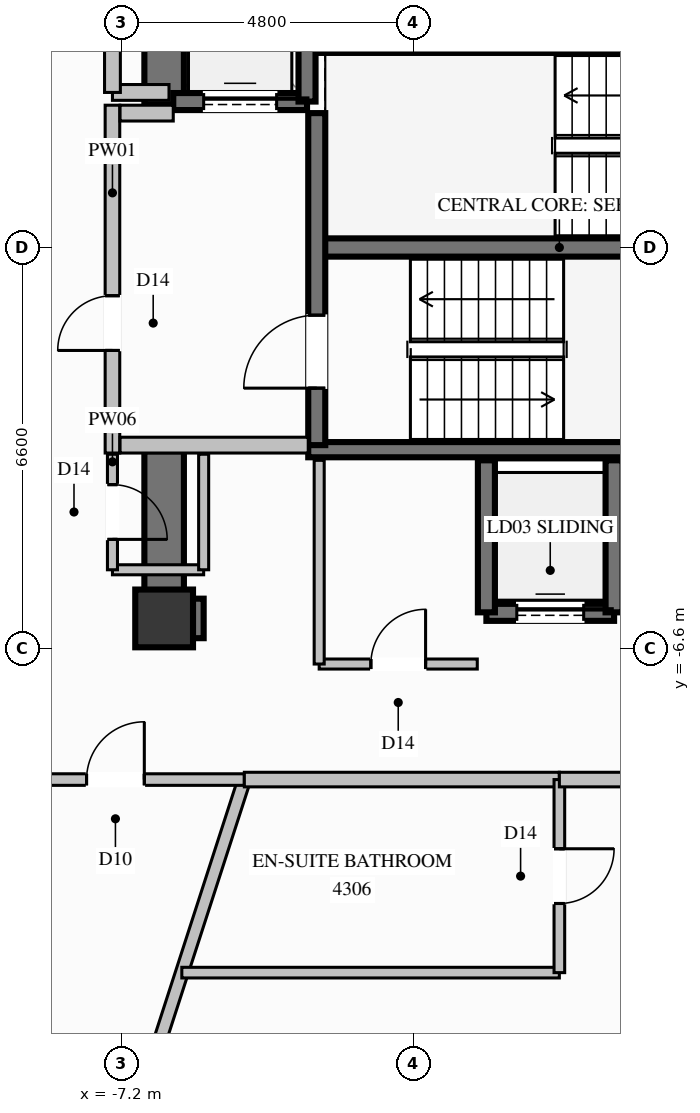
"""IFC4 building model, lengths in metres.
Left out: names, types, materials, properties, quantities, classifications, styles, units other than length and angle.
Written with IfcOpenShell. Run it as: python <this file> out.ifc"""

import sys

from ifc_helpers import new_model, si_unit, direction, frame, frame_2d, origin, origin_2d, place, context, subcontext, project, spatial, rectangle, extrude, element, fill, save


model = new_model("IFC4")
c1 = context("Model", 3, precision=1e-05, world=origin(), true_north=direction((0.0, 1.0)))
c2 = subcontext(c1, "Body", "Model", "MODEL_VIEW")
j1 = project(units=[si_unit("LENGTHUNIT", "METRE"), si_unit("PLANEANGLEUNIT", "RADIAN")], contexts=[c1])
p1 = place(None, origin())
s1 = spatial("IfcSite", under=j1, at=p1, CompositionType="ELEMENT")
p2 = place(p1, origin())
s2 = spatial("IfcBuilding", under=s1, at=p2, CompositionType="ELEMENT")
p3 = place(p2, frame((0.0, 0.0, 160.2)))
s3 = spatial("IfcBuildingStorey", under=s2, at=p3, CompositionType="ELEMENT", Elevation=160.2)
p4 = place(p3, frame((-6.5, -6.1, 0.0), z_axis=(0.0, 0.0, 1.0), x_axis=(1.0, 0.0, 0.0)))
e1 = element("IfcColumn", 1, at=p4, inside=s3, PredefinedType="COLUMN", context=c2, shape_type="SweptSolid", body=[
    extrude(rectangle(XDim=0.95, YDim=0.95, at=origin_2d()), origin(), (0.0, 0.0, 1.0), 3.6),
])
p5 = place(p3, frame((-3.99, 0.0, 0.0), z_axis=(0.0, 0.0, 1.0), x_axis=(1.0, 0.0, 0.0)))
e2 = element("IfcWall", 2, at=p5, inside=s3, PredefinedType="SHEAR", context=c2, shape_type="SweptSolid", body=[
    extrude(rectangle(XDim=7.98, YDim=0.3, at=frame_2d((3.99, 0.0))), origin(), (0.0, 0.0, 1.0), 3.6),
])
for number, where, z_axis, x_axis in (
    (3, (-4.13, -3.325, 0.0), (0.0, 0.0, 1.0), (1.0, 0.0, 0.0)),
    (4, (-4.13, 3.325, 0.0), (0.0, 0.0, 1.0), (1.0, 0.0, 0.0)),
):
    element("IfcWall", number, at=place(p3, frame(where, z_axis=z_axis, x_axis=x_axis)), inside=s3, PredefinedType="SOLIDWALL", context=c2, shape_type="SweptSolid", body=[
        extrude(rectangle(XDim=8.26, YDim=0.25, at=frame_2d((4.13, 0.0))), origin(), (0.0, 0.0, 1.0), 3.6),
    ])
p6 = place(p3, frame((-6.175, -6.1, 0.0), z_axis=(0.0, 0.0, 1.0), x_axis=(1.0, 0.0, 0.0)))
e5 = element("IfcWall", 5, at=p6, inside=s3, PredefinedType="SHEAR", context=c2, shape_type="SweptSolid", body=[
    extrude(rectangle(XDim=0.325, YDim=0.65, at=frame_2d((0.163, 0.0))), origin(), (0.0, 0.0, 1.0), 3.6),
])
p7 = place(p3, frame((-6.5, 2.35, 0.0), z_axis=(0.0, 0.0, 1.0), x_axis=(0.0, 1.0, 0.0)))
e6 = element("IfcWall", 6, at=p7, inside=s3, PredefinedType="SHEAR", context=c2, shape_type="SweptSolid", body=[
    extrude(rectangle(XDim=4.075, YDim=0.65, at=frame_2d((2.038, 0.0))), origin(), (0.0, 0.0, 1.0), 3.6),
])
p8 = place(p3, frame((-6.5, -6.425, 0.0), z_axis=(0.0, 0.0, 1.0), x_axis=(0.0, 1.0, 0.0)))
e7 = element("IfcWall", 7, at=p8, inside=s3, PredefinedType="SHEAR", context=c2, shape_type="SweptSolid", body=[
    extrude(rectangle(XDim=3.075, YDim=0.65, at=frame_2d((1.538, 0.0))), origin(), (0.0, 0.0, 1.0), 3.6),
])
p9 = place(p3, frame((-1.2, -6.0, 0.0), z_axis=(0.0, 0.0, 1.0), x_axis=(1.0, 0.0, 0.0)))
e8 = element("IfcWall", 8, at=p9, inside=s3, PredefinedType="SOLIDWALL", context=c2, shape_type="SweptSolid", body=[
    extrude(rectangle(XDim=2.1, YDim=0.28, at=frame_2d((1.05, 0.0))), origin(), (0.0, 0.0, 1.0), 3.2),
])
p10 = place(p9, frame((0.5, 0.0, 0.0)))
e9 = element("IfcOpeningElement", 9, at=p10, cuts=e8, PredefinedType="OPENING", context=c2, shape_type="SweptSolid", body=[
    extrude(rectangle(XDim=1.1, YDim=2.02, at=frame_2d((0.55, 1.01))), frame((0.0, 0.15, 0.0), z_axis=(0.0, -1.0, 0.0), x_axis=(1.0, 0.0, 0.0)), (0.0, 0.0, 1.0), 0.3),
])
for number, where, z_axis, x_axis in (
    (10, (-1.2, -3.5, 0.0), (0.0, 0.0, 1.0), (0.0, -1.0, 0.0)),
    (11, (0.9, -6.0, 0.0), (0.0, 0.0, 1.0), (0.0, 1.0, 0.0)),
):
    element("IfcWall", number, at=place(p3, frame(where, z_axis=z_axis, x_axis=x_axis)), inside=s3, PredefinedType="SOLIDWALL", context=c2, shape_type="SweptSolid", body=[
        extrude(rectangle(XDim=2.5, YDim=0.28, at=frame_2d((1.25, 0.0))), origin(), (0.0, 0.0, 1.0), 3.2),
    ])
p11 = place(p3, frame((-6.35, 2.4, 0.0), z_axis=(0.0, 0.0, 1.0), x_axis=(1.0, 0.0, 0.0)))
e12 = element("IfcWall", 12, at=p11, inside=s3, PredefinedType="SOLIDWALL", context=c2, shape_type="SweptSolid", body=[
    extrude(rectangle(XDim=2.2, YDim=0.28, at=frame_2d((1.1, 0.0))), origin(), (0.0, 0.0, 1.0), 3.2),
])
p12 = place(p11, frame((0.5, 0.0, 0.0)))
e13 = element("IfcOpeningElement", 13, at=p12, cuts=e12, PredefinedType="OPENING", context=c2, shape_type="SweptSolid", body=[
    extrude(rectangle(XDim=1.2, YDim=2.2, at=frame_2d((0.6, 1.1))), frame((0.0, 0.15, 0.0), z_axis=(0.0, -1.0, 0.0), x_axis=(1.0, 0.0, 0.0)), (0.0, 0.0, 1.0), 0.3),
])
p13 = place(p3, frame((-4.15, 2.4, 0.0), z_axis=(0.0, 0.0, 1.0), x_axis=(0.0, 1.0, 0.0)))
e14 = element("IfcWall", 14, at=p13, inside=s3, PredefinedType="SOLIDWALL", context=c2, shape_type="SweptSolid", body=[
    extrude(rectangle(XDim=2.7, YDim=0.28, at=frame_2d((1.35, 0.0))), origin(), (0.0, 0.0, 1.0), 3.2),
])
p14 = place(p3, frame((-3.99, -3.25, 0.0), z_axis=(0.0, 0.0, 1.0), x_axis=(0.0, 1.0, 0.0)))
e15 = element("IfcWall", 15, at=p14, inside=s3, PredefinedType="SOLIDWALL", context=c2, shape_type="SweptSolid", body=[
    extrude(rectangle(XDim=5.46, YDim=0.28, at=frame_2d((2.73, 0.0))), origin(), (0.0, 0.0, 1.0), 3.2),
])
p15 = place(p14, frame((0.937, 0.0, 0.0)))
e16 = element("IfcOpeningElement", 16, at=p15, cuts=e15, PredefinedType="OPENING", context=c2, shape_type="SweptSolid", body=[
    extrude(rectangle(XDim=1.2, YDim=2.2, at=frame_2d((0.6, 1.1))), frame((0.0, 0.15, 0.0), z_axis=(0.0, -1.0, 0.0), x_axis=(1.0, 0.0, 0.0)), (0.0, 0.0, 1.0), 0.3),
])
p16 = place(p3, frame((-7.35, -3.38, 0.0), z_axis=(0.0, 0.0, 1.0), x_axis=(0.0, 1.0, 0.0)))
e17 = element("IfcWall", 17, at=p16, inside=s3, PredefinedType="PARTITIONING", context=c2, shape_type="SweptSolid", body=[
    extrude(rectangle(XDim=5.72, YDim=0.24, at=frame_2d((2.86, 0.0))), origin(), (0.0, 0.0, 1.0), 3.2),
])
p17 = place(p16, frame((1.687, 0.0, 0.0)))
e18 = element("IfcOpeningElement", 18, at=p17, cuts=e17, PredefinedType="OPENING", context=c2, shape_type="SweptSolid", body=[
    extrude(rectangle(XDim=0.9, YDim=2.02, at=frame_2d((0.45, 1.01))), frame((0.0, 0.13, 0.0), z_axis=(0.0, -1.0, 0.0), x_axis=(1.0, 0.0, 0.0)), (0.0, 0.0, 1.0), 0.26),
])
p18 = place(p3, frame((-7.225, -3.25, 0.0), z_axis=(0.0, 0.0, 1.0), x_axis=(1.0, 0.0, 0.0)))
e19 = element("IfcWall", 19, at=p18, inside=s3, PredefinedType="PARTITIONING", context=c2, shape_type="SweptSolid", body=[
    extrude(rectangle(XDim=3.095, YDim=0.26, at=frame_2d((1.548, 0.0))), origin(), (0.0, 0.0, 1.0), 3.2),
])
p19 = place(p3, frame((-7.225, 2.21, 0.0), z_axis=(0.0, 0.0, 1.0), x_axis=(1.0, 0.0, 0.0)))
e20 = element("IfcWall", 20, at=p19, inside=s3, PredefinedType="PARTITIONING", context=c2, shape_type="SweptSolid", body=[
    extrude(rectangle(XDim=0.875, YDim=0.26, at=frame_2d((0.438, 0.0))), origin(), (0.0, 0.0, 1.0), 3.2),
])
p20 = place(p3, frame((-7.35, 2.55, 0.0), z_axis=(0.0, 0.0, 1.0), x_axis=(1.0, 0.0, 0.0)))
e21 = element("IfcWall", 21, at=p20, inside=s3, PredefinedType="PARTITIONING", context=c2, shape_type="SweptSolid", body=[
    extrude(rectangle(XDim=0.93, YDim=0.26, at=frame_2d((0.465, 0.0))), origin(), (0.0, 0.0, 1.0), 3.2),
])
p21 = place(p3, frame((-7.35, 2.55, 0.0), z_axis=(0.0, 0.0, 1.0), x_axis=(0.0, 1.0, 0.0)))
e22 = element("IfcWall", 22, at=p21, inside=s3, PredefinedType="PARTITIONING", context=c2, shape_type="SweptSolid", body=[
    extrude(rectangle(XDim=2.4, YDim=0.26, at=frame_2d((1.2, 0.0))), origin(), (0.0, 0.0, 1.0), 3.2),
])
p22 = place(p21, frame((0.75, 0.0, 0.0)))
e23 = element("IfcOpeningElement", 23, at=p22, cuts=e22, PredefinedType="OPENING", context=c2, shape_type="SweptSolid", body=[
    extrude(rectangle(XDim=0.9, YDim=2.02, at=frame_2d((0.45, 1.01))), frame((0.0, 0.14, 0.0), z_axis=(0.0, -1.0, 0.0), x_axis=(1.0, 0.0, 0.0)), (0.0, 0.0, 1.0), 0.28),
])
p23 = place(p3, frame((-7.35, -5.3, 0.0), z_axis=(0.0, 0.0, 1.0), x_axis=(1.0, 0.0, 0.0)))
e24 = element("IfcWall", 24, at=p23, inside=s3, PredefinedType="PARTITIONING", context=c2, shape_type="SweptSolid", body=[
    extrude(rectangle(XDim=1.5, YDim=0.165, at=frame_2d((0.75, 0.0))), origin(), (0.0, 0.0, 1.0), 3.2),
])
p24 = place(p3, frame((-5.85, -5.3, 0.0), z_axis=(0.0, 0.0, 1.0), x_axis=(0.0, 1.0, 0.0)))
e25 = element("IfcWall", 25, at=p24, inside=s3, PredefinedType="PARTITIONING", context=c2, shape_type="SweptSolid", body=[
    extrude(rectangle(XDim=1.9, YDim=0.165, at=frame_2d((0.95, 0.0))), origin(), (0.0, 0.0, 1.0), 2.067),
])
p25 = place(p3, frame((-7.35, -3.4, 0.0), z_axis=(0.0, 0.0, 1.0), x_axis=(0.0, -1.0, 0.0)))
e26 = element("IfcWall", 26, at=p25, inside=s3, PredefinedType="PARTITIONING", context=c2, shape_type="SweptSolid", body=[
    extrude(rectangle(XDim=1.9, YDim=0.165, at=frame_2d((0.95, 0.0))), origin(), (0.0, 0.0, 1.0), 3.2),
])
p26 = place(p25, frame((0.5, 0.0, 0.0)))
e27 = element("IfcOpeningElement", 27, at=p26, cuts=e26, PredefinedType="OPENING", context=c2, shape_type="SweptSolid", body=[
    extrude(rectangle(XDim=0.9, YDim=2.02, at=frame_2d((0.45, 1.01))), frame((0.0, 0.093, 0.0), z_axis=(0.0, -1.0, 0.0), x_axis=(1.0, 0.0, 0.0)), (0.0, 0.0, 1.0), 0.185),
])
p27 = place(p3, frame((-3.95, -6.85, 0.0), z_axis=(0.0, 0.0, 1.0), x_axis=(1.0, 0.0, 0.0)))
e28 = element("IfcWall", 28, at=p27, inside=s3, PredefinedType="PARTITIONING", context=c2, shape_type="SweptSolid", body=[
    extrude(rectangle(XDim=2.6, YDim=0.165, at=frame_2d((1.3, 0.0))), origin(), (0.0, 0.0, 1.0), 3.2),
])
p28 = place(p27, frame((0.85, 0.0, 0.0)))
e29 = element("IfcOpeningElement", 29, at=p28, cuts=e28, PredefinedType="OPENING", context=c2, shape_type="SweptSolid", body=[
    extrude(rectangle(XDim=0.9, YDim=2.02, at=frame_2d((0.45, 1.01))), frame((0.0, 0.093, 0.0), z_axis=(0.0, -1.0, 0.0), x_axis=(1.0, 0.0, 0.0)), (0.0, 0.0, 1.0), 0.185),
])
p29 = place(p3, frame((-3.95, -3.5, 0.0), z_axis=(0.0, 0.0, 1.0), x_axis=(0.0, -1.0, 0.0)))
e30 = element("IfcWall", 30, at=p29, inside=s3, PredefinedType="PARTITIONING", context=c2, shape_type="SweptSolid", body=[
    extrude(rectangle(XDim=3.35, YDim=0.165, at=frame_2d((1.675, 0.0))), origin(), (0.0, 0.0, 1.0), 3.2),
])
p30 = place(p3, frame((-5.181, -8.75, 0.0), z_axis=(0.0, 0.0, 1.0), x_axis=(-0.308017807396, -0.951380591733, 0.0)))
e31 = element("IfcWall", 31, at=p30, inside=s3, PredefinedType="PARTITIONING", context=c2, shape_type="SweptSolid", body=[
    extrude(rectangle(XDim=11.123, YDim=0.21, at=frame_2d((5.562, 0.0))), origin(), (0.0, 0.0, 1.0), 2.067),
])
p31 = place(p3, frame((-9.42, -8.75, 0.0), z_axis=(0.0, 0.0, 1.0), x_axis=(1.0, 0.0, 0.0)))
e32 = element("IfcWall", 32, at=p31, inside=s3, PredefinedType="PARTITIONING", context=c2, shape_type="SweptSolid", body=[
    extrude(rectangle(XDim=4.239, YDim=0.19, at=frame_2d((2.12, 0.0))), origin(), (0.0, 0.0, 1.0), 3.2),
])
p32 = place(p31, frame((1.644, 0.0, 0.0)))
e33 = element("IfcOpeningElement", 33, at=p32, cuts=e32, PredefinedType="OPENING", context=c2, shape_type="SweptSolid", body=[
    extrude(rectangle(XDim=0.95, YDim=2.1, at=frame_2d((0.475, 1.05))), frame((0.0, 0.105, 0.0), z_axis=(0.0, -1.0, 0.0), x_axis=(1.0, 0.0, 0.0)), (0.0, 0.0, 1.0), 0.21),
])
p33 = place(p3, frame((-5.181, -8.75, 0.0), z_axis=(0.0, 0.0, 1.0), x_axis=(1.0, 0.0, 0.0)))
e34 = element("IfcWall", 34, at=p33, inside=s3, PredefinedType="PARTITIONING", context=c2, shape_type="SweptSolid", body=[
    extrude(rectangle(XDim=5.181, YDim=0.24, at=frame_2d((2.59, 0.0))), origin(), (0.0, 0.0, 1.0), 3.2),
])
p34 = place(p3, frame((-6.209, -11.925, 0.0), z_axis=(0.0, 0.0, 1.0), x_axis=(1.0, 0.0, 0.0)))
e35 = element("IfcWall", 35, at=p34, inside=s3, PredefinedType="PLUMBINGWALL", context=c2, shape_type="SweptSolid", body=[
    extrude(rectangle(XDim=6.209, YDim=0.175, at=frame_2d((3.104, 0.0))), origin(), (0.0, 0.0, 1.0), 3.2),
])
p35 = place(p3, frame((0.0, -8.75, 0.0), z_axis=(0.0, 0.0, 1.0), x_axis=(0.0, -1.0, 0.0)))
e36 = element("IfcWall", 36, at=p35, inside=s3, PredefinedType="PLUMBINGWALL", context=c2, shape_type="SweptSolid", body=[
    extrude(rectangle(XDim=3.175, YDim=0.175, at=frame_2d((1.587, 0.0))), origin(), (0.0, 0.0, 1.0), 2.067),
])
p36 = place(p35, frame((1.138, 0.0, 0.0)))
e37 = element("IfcOpeningElement", 37, at=p36, cuts=e36, PredefinedType="OPENING", context=c2, shape_type="SweptSolid", body=[
    extrude(rectangle(XDim=0.9, YDim=2.02, at=frame_2d((0.45, 1.01))), frame((0.0, 0.098, 0.0), z_axis=(0.0, -1.0, 0.0), x_axis=(1.0, 0.0, 0.0)), (0.0, 0.0, 1.0), 0.195),
])
p37 = place(p3, frame((0.0, -8.75, 0.0), z_axis=(0.0, 0.0, 1.0), x_axis=(1.0, 0.0, 0.0)))
e38 = element("IfcWall", 38, at=p37, inside=s3, PredefinedType="PARTITIONING", context=c2, shape_type="SweptSolid", body=[
    extrude(rectangle(XDim=5.346, YDim=0.24, at=frame_2d((2.673, 0.0))), origin(), (0.0, 0.0, 1.0), 3.2),
])
p38 = place(p37, frame((2.173, 0.0, 0.0)))
e39 = element("IfcOpeningElement", 39, at=p38, cuts=e38, PredefinedType="OPENING", context=c2, shape_type="SweptSolid", body=[
    extrude(rectangle(XDim=1.0, YDim=2.2, at=frame_2d((0.5, 1.1))), frame((0.0, 0.13, 0.0), z_axis=(0.0, -1.0, 0.0), x_axis=(1.0, 0.0, 0.0)), (0.0, 0.0, 1.0), 0.26),
])
p39 = place(p10, origin())
e40 = element("IfcDoor", 40, at=p39, inside=s3, OperationType="SLIDING_TO_LEFT", PredefinedType="DOOR", context=c2, shape_type="SweptSolid", body=[
    extrude(rectangle(XDim=1.1, YDim=2.02, at=frame_2d((0.55, 1.01))), frame((0.0, 0.025, 0.0), z_axis=(0.0, -1.0, 0.0), x_axis=(1.0, 0.0, 0.0)), (0.0, 0.0, 1.0), 0.05),
])
fill(e9, e40)
p40 = place(p12, origin())
e41 = element("IfcDoor", 41, at=p40, inside=s3, OperationType="SLIDING_TO_LEFT", PredefinedType="DOOR", context=c2, shape_type="SweptSolid", body=[
    extrude(rectangle(XDim=1.2, YDim=2.2, at=frame_2d((0.6, 1.1))), frame((0.0, 0.025, 0.0), z_axis=(0.0, -1.0, 0.0), x_axis=(1.0, 0.0, 0.0)), (0.0, 0.0, 1.0), 0.05),
])
fill(e13, e41)
p41 = place(p15, origin())
e42 = element("IfcDoor", 42, at=p41, inside=s3, OperationType="SINGLE_SWING_LEFT", PredefinedType="DOOR", context=c2, shape_type="SweptSolid", body=[
    extrude(rectangle(XDim=1.2, YDim=2.2, at=frame_2d((0.6, 1.1))), frame((0.0, 0.025, 0.0), z_axis=(0.0, -1.0, 0.0), x_axis=(1.0, 0.0, 0.0)), (0.0, 0.0, 1.0), 0.05),
])
fill(e16, e42)
p42 = place(p17, origin())
e43 = element("IfcDoor", 43, at=p42, inside=s3, OperationType="SINGLE_SWING_LEFT", PredefinedType="DOOR", context=c2, shape_type="SweptSolid", body=[
    extrude(rectangle(XDim=0.9, YDim=2.02, at=frame_2d((0.45, 1.01))), frame((0.0, 0.025, 0.0), z_axis=(0.0, -1.0, 0.0), x_axis=(1.0, 0.0, 0.0)), (0.0, 0.0, 1.0), 0.05),
])
fill(e18, e43)
p43 = place(p26, origin())
e44 = element("IfcDoor", 44, at=p43, inside=s3, OperationType="SINGLE_SWING_RIGHT", PredefinedType="DOOR", context=c2, shape_type="SweptSolid", body=[
    extrude(rectangle(XDim=0.9, YDim=2.02, at=frame_2d((0.45, 1.01))), frame((0.0, 0.025, 0.0), z_axis=(0.0, -1.0, 0.0), x_axis=(1.0, 0.0, 0.0)), (0.0, 0.0, 1.0), 0.05),
])
fill(e27, e44)
p44 = place(p28, origin())
e45 = element("IfcDoor", 45, at=p44, inside=s3, OperationType="SINGLE_SWING_RIGHT", PredefinedType="DOOR", context=c2, shape_type="SweptSolid", body=[
    extrude(rectangle(XDim=0.9, YDim=2.02, at=frame_2d((0.45, 1.01))), frame((0.0, 0.025, 0.0), z_axis=(0.0, -1.0, 0.0), x_axis=(1.0, 0.0, 0.0)), (0.0, 0.0, 1.0), 0.05),
])
fill(e29, e45)
p45 = place(p32, origin())
e46 = element("IfcDoor", 46, at=p45, inside=s3, OperationType="SINGLE_SWING_RIGHT", PredefinedType="DOOR", context=c2, shape_type="SweptSolid", body=[
    extrude(rectangle(XDim=0.95, YDim=2.1, at=frame_2d((0.475, 1.05))), frame((0.0, 0.025, 0.0), z_axis=(0.0, -1.0, 0.0), x_axis=(1.0, 0.0, 0.0)), (0.0, 0.0, 1.0), 0.05),
])
fill(e33, e46)
p46 = place(p36, origin())
e47 = element("IfcDoor", 47, at=p46, inside=s3, OperationType="SINGLE_SWING_LEFT", PredefinedType="DOOR", context=c2, shape_type="SweptSolid", body=[
    extrude(rectangle(XDim=0.9, YDim=2.02, at=frame_2d((0.45, 1.01))), frame((0.0, 0.025, 0.0), z_axis=(0.0, -1.0, 0.0), x_axis=(1.0, 0.0, 0.0)), (0.0, 0.0, 1.0), 0.05),
])
fill(e37, e47)
save(model, sys.argv[1])
